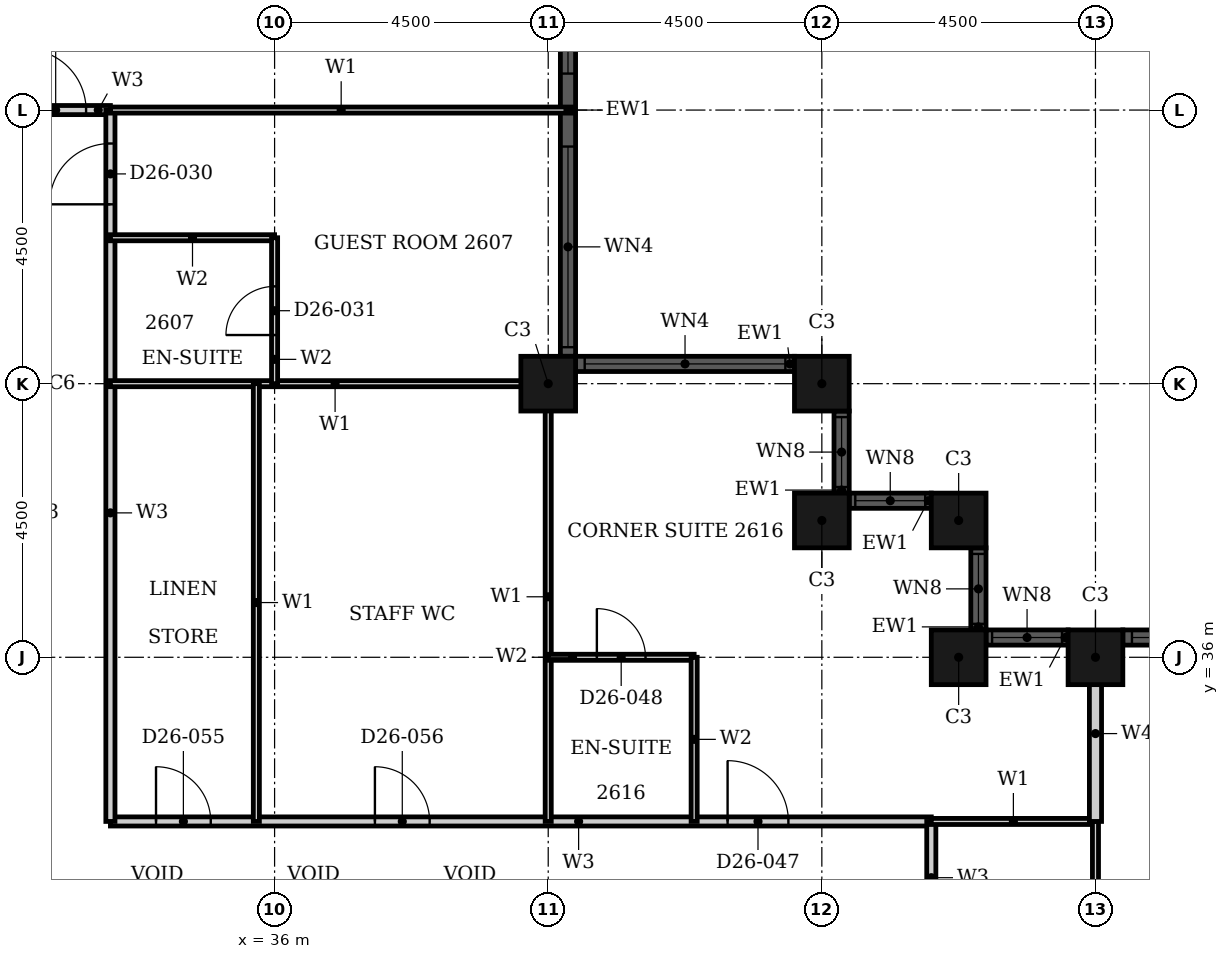
"""IFC4 building model, lengths in metres.
Left out: names, types, materials, properties, quantities, classifications, styles, units other than length and angle.
Written with IfcOpenShell. Run it as: python <this file> out.ifc"""

import sys

from ifc_helpers import new_model, si_unit, direction, frame, frame_2d, origin, origin_2d, place, context, subcontext, project, spatial, rectangle, hollow_rectangle, extrude, element, fill, save


model = new_model("IFC4")
c1 = context("Model", 3, precision=1e-05, world=origin(), true_north=direction((0.0, 1.0)))
c2 = subcontext(c1, "Body", "Model", "MODEL_VIEW")
j1 = project(units=[si_unit("LENGTHUNIT", "METRE"), si_unit("PLANEANGLEUNIT", "RADIAN")], contexts=[c1])
p1 = place(None, origin())
s1 = spatial("IfcSite", under=j1, at=p1, CompositionType="ELEMENT")
p2 = place(p1, origin())
s2 = spatial("IfcBuilding", under=s1, at=p2, CompositionType="ELEMENT")
p3 = place(p2, frame((0.0, 0.0, 108.0)))
s3 = spatial("IfcBuildingStorey", under=s2, at=p3, CompositionType="ELEMENT", Elevation=108.0)
for number, where, z_axis, x_axis in (
    (1, (49.5, 36.0, 0.0), (0.0, 0.0, 1.0), (1.0, 0.0, 0.0)),
    (2, (47.25, 36.0, 0.0), (0.0, 0.0, 1.0), (1.0, 0.0, 0.0)),
    (3, (47.25, 38.25, 0.0), (0.0, 0.0, 1.0), (1.0, 0.0, 0.0)),
    (4, (45.0, 38.25, 0.0), (0.0, 0.0, 1.0), (1.0, 0.0, 0.0)),
    (5, (45.0, 40.5, 0.0), (0.0, 0.0, 1.0), (1.0, 0.0, 0.0)),
    (6, (40.5, 40.5, 0.0), (0.0, 0.0, 1.0), (1.0, 0.0, 0.0)),
):
    element("IfcColumn", number, at=place(p3, frame(where, z_axis=z_axis, x_axis=x_axis)), inside=s3, PredefinedType="COLUMN", context=c2, shape_type="SweptSolid", body=[
        extrude(hollow_rectangle(XDim=0.9, YDim=0.9, WallThickness=0.028, at=origin_2d()), origin(), (0.0, 0.0, 1.0), 3.6),
    ])
p4 = place(p3, frame((58.05, 36.325, 0.0), z_axis=(0.0, 0.0, 1.0), x_axis=(-1.0, 0.0, 0.0)))
e7 = element("IfcWall", 7, at=p4, inside=s3, PredefinedType="SOLIDWALL", context=c2, shape_type="SweptSolid", body=[
    extrude(rectangle(XDim=8.1, YDim=0.25, at=frame_2d((4.05, 0.0))), origin(), (0.0, 0.0, 1.0), 3.6),
])
p5 = place(p4, frame((0.15, 0.0, 0.9)))
e8 = element("IfcOpeningElement", 8, at=p5, cuts=e7, PredefinedType="OPENING", context=c2, shape_type="SweptSolid", body=[
    extrude(rectangle(XDim=3.3, YDim=2.08, at=frame_2d((1.65, 1.04))), frame((0.0, 0.135, 0.0), z_axis=(0.0, -1.0, 0.0), x_axis=(1.0, 0.0, 0.0)), (0.0, 0.0, 1.0), 0.27),
])
p6 = place(p4, frame((4.65, 0.0, 0.9)))
e9 = element("IfcOpeningElement", 9, at=p6, cuts=e7, PredefinedType="OPENING", context=c2, shape_type="SweptSolid", body=[
    extrude(rectangle(XDim=3.3, YDim=2.08, at=frame_2d((1.65, 1.04))), frame((0.0, 0.135, 0.0), z_axis=(0.0, -1.0, 0.0), x_axis=(1.0, 0.0, 0.0)), (0.0, 0.0, 1.0), 0.27),
])
p7 = place(p3, frame((49.05, 36.325, 0.0), z_axis=(0.0, 0.0, 1.0), x_axis=(-1.0, 0.0, 0.0)))
e10 = element("IfcWall", 10, at=p7, inside=s3, PredefinedType="SOLIDWALL", context=c2, shape_type="SweptSolid", body=[
    extrude(rectangle(XDim=1.35, YDim=0.25, at=frame_2d((0.675, 0.0))), origin(), (0.0, 0.0, 1.0), 3.6),
])
p8 = place(p7, frame((0.1, 0.0, 0.9)))
e11 = element("IfcOpeningElement", 11, at=p8, cuts=e10, PredefinedType="OPENING", context=c2, shape_type="SweptSolid", body=[
    extrude(rectangle(XDim=1.15, YDim=2.08, at=frame_2d((0.575, 1.04))), frame((0.0, 0.135, 0.0), z_axis=(0.0, -1.0, 0.0), x_axis=(1.0, 0.0, 0.0)), (0.0, 0.0, 1.0), 0.27),
])
p9 = place(p3, frame((47.575, 36.45, 0.0), z_axis=(0.0, 0.0, 1.0), x_axis=(0.0, 1.0, 0.0)))
e12 = element("IfcWall", 12, at=p9, inside=s3, PredefinedType="SOLIDWALL", context=c2, shape_type="SweptSolid", body=[
    extrude(rectangle(XDim=1.35, YDim=0.25, at=frame_2d((0.675, 0.0))), origin(), (0.0, 0.0, 1.0), 3.6),
])
p10 = place(p9, frame((0.1, 0.0, 0.9)))
e13 = element("IfcOpeningElement", 13, at=p10, cuts=e12, PredefinedType="OPENING", context=c2, shape_type="SweptSolid", body=[
    extrude(rectangle(XDim=1.15, YDim=2.08, at=frame_2d((0.575, 1.04))), frame((0.0, 0.135, 0.0), z_axis=(0.0, -1.0, 0.0), x_axis=(1.0, 0.0, 0.0)), (0.0, 0.0, 1.0), 0.27),
])
p11 = place(p3, frame((46.8, 38.575, 0.0), z_axis=(0.0, 0.0, 1.0), x_axis=(-1.0, 0.0, 0.0)))
e14 = element("IfcWall", 14, at=p11, inside=s3, PredefinedType="SOLIDWALL", context=c2, shape_type="SweptSolid", body=[
    extrude(rectangle(XDim=1.35, YDim=0.25, at=frame_2d((0.675, 0.0))), origin(), (0.0, 0.0, 1.0), 3.6),
])
p12 = place(p11, frame((0.1, 0.0, 0.9)))
e15 = element("IfcOpeningElement", 15, at=p12, cuts=e14, PredefinedType="OPENING", context=c2, shape_type="SweptSolid", body=[
    extrude(rectangle(XDim=1.15, YDim=2.08, at=frame_2d((0.575, 1.04))), frame((0.0, 0.135, 0.0), z_axis=(0.0, -1.0, 0.0), x_axis=(1.0, 0.0, 0.0)), (0.0, 0.0, 1.0), 0.27),
])
p13 = place(p3, frame((45.325, 38.7, 0.0), z_axis=(0.0, 0.0, 1.0), x_axis=(0.0, 1.0, 0.0)))
e16 = element("IfcWall", 16, at=p13, inside=s3, PredefinedType="SOLIDWALL", context=c2, shape_type="SweptSolid", body=[
    extrude(rectangle(XDim=1.35, YDim=0.25, at=frame_2d((0.675, 0.0))), origin(), (0.0, 0.0, 1.0), 3.6),
])
p14 = place(p13, frame((0.1, 0.0, 0.9)))
e17 = element("IfcOpeningElement", 17, at=p14, cuts=e16, PredefinedType="OPENING", context=c2, shape_type="SweptSolid", body=[
    extrude(rectangle(XDim=1.15, YDim=2.08, at=frame_2d((0.575, 1.04))), frame((0.0, 0.135, 0.0), z_axis=(0.0, -1.0, 0.0), x_axis=(1.0, 0.0, 0.0)), (0.0, 0.0, 1.0), 0.27),
])
p15 = place(p3, frame((44.55, 40.825, 0.0), z_axis=(0.0, 0.0, 1.0), x_axis=(-1.0, 0.0, 0.0)))
e18 = element("IfcWall", 18, at=p15, inside=s3, PredefinedType="SOLIDWALL", context=c2, shape_type="SweptSolid", body=[
    extrude(rectangle(XDim=3.6, YDim=0.25, at=frame_2d((1.8, 0.0))), origin(), (0.0, 0.0, 1.0), 3.6),
])
p16 = place(p15, frame((0.15, 0.0, 0.9)))
e19 = element("IfcOpeningElement", 19, at=p16, cuts=e18, PredefinedType="OPENING", context=c2, shape_type="SweptSolid", body=[
    extrude(rectangle(XDim=3.3, YDim=2.08, at=frame_2d((1.65, 1.04))), frame((0.0, 0.135, 0.0), z_axis=(0.0, -1.0, 0.0), x_axis=(1.0, 0.0, 0.0)), (0.0, 0.0, 1.0), 0.27),
])
p17 = place(p3, frame((40.825, 40.95, 0.0), z_axis=(0.0, 0.0, 1.0), x_axis=(0.0, 1.0, 0.0)))
e20 = element("IfcWall", 20, at=p17, inside=s3, PredefinedType="SOLIDWALL", context=c2, shape_type="SweptSolid", body=[
    extrude(rectangle(XDim=8.1, YDim=0.25, at=frame_2d((4.05, 0.0))), origin(), (0.0, 0.0, 1.0), 3.6),
])
p18 = place(p17, frame((0.15, 0.0, 0.9)))
e21 = element("IfcOpeningElement", 21, at=p18, cuts=e20, PredefinedType="OPENING", context=c2, shape_type="SweptSolid", body=[
    extrude(rectangle(XDim=3.3, YDim=2.08, at=frame_2d((1.65, 1.04))), frame((0.0, 0.135, 0.0), z_axis=(0.0, -1.0, 0.0), x_axis=(1.0, 0.0, 0.0)), (0.0, 0.0, 1.0), 0.27),
])
p19 = place(p17, frame((4.65, 0.0, 0.9)))
e22 = element("IfcOpeningElement", 22, at=p19, cuts=e20, PredefinedType="OPENING", context=c2, shape_type="SweptSolid", body=[
    extrude(rectangle(XDim=3.3, YDim=2.08, at=frame_2d((1.65, 1.04))), frame((0.0, 0.135, 0.0), z_axis=(0.0, -1.0, 0.0), x_axis=(1.0, 0.0, 0.0)), (0.0, 0.0, 1.0), 0.27),
])
p20 = place(p3, frame((33.3, 33.3, 0.0), z_axis=(0.0, 0.0, 1.0), x_axis=(1.0, 0.0, 0.0)))
e23 = element("IfcWall", 23, at=p20, inside=s3, PredefinedType="PARTITIONING", context=c2, shape_type="SweptSolid", body=[
    extrude(rectangle(XDim=13.5, YDim=0.15, at=frame_2d((6.75, 0.0))), origin(), (0.0, 0.0, 1.0), 3.3),
])
p21 = place(p20, frame((10.15, 0.0, 0.0)))
e24 = element("IfcOpeningElement", 24, at=p21, cuts=e23, PredefinedType="OPENING", context=c2, shape_type="SweptSolid", body=[
    extrude(rectangle(XDim=1.0, YDim=2.1, at=frame_2d((0.5, 1.05))), frame((0.0, 0.085, 0.0), z_axis=(0.0, -1.0, 0.0), x_axis=(1.0, 0.0, 0.0)), (0.0, 0.0, 1.0), 0.17),
])
p22 = place(p20, frame((0.75, 0.0, 0.0)))
e25 = element("IfcOpeningElement", 25, at=p22, cuts=e23, PredefinedType="OPENING", context=c2, shape_type="SweptSolid", body=[
    extrude(rectangle(XDim=0.9, YDim=2.1, at=frame_2d((0.45, 1.05))), frame((0.0, 0.085, 0.0), z_axis=(0.0, -1.0, 0.0), x_axis=(1.0, 0.0, 0.0)), (0.0, 0.0, 1.0), 0.17),
])
p23 = place(p20, frame((4.35, 0.0, 0.0)))
e26 = element("IfcOpeningElement", 26, at=p23, cuts=e23, PredefinedType="OPENING", context=c2, shape_type="SweptSolid", body=[
    extrude(rectangle(XDim=0.9, YDim=2.1, at=frame_2d((0.45, 1.05))), frame((0.0, 0.085, 0.0), z_axis=(0.0, -1.0, 0.0), x_axis=(1.0, 0.0, 0.0)), (0.0, 0.0, 1.0), 0.17),
])
p24 = place(p3, frame((31.5, 45.0, 0.0), z_axis=(0.0, 0.0, 1.0), x_axis=(1.0, 0.0, 0.0)))
e27 = element("IfcWall", 27, at=p24, inside=s3, PredefinedType="PARTITIONING", context=c2, shape_type="SweptSolid", body=[
    extrude(rectangle(XDim=1.8, YDim=0.15, at=frame_2d((0.9, 0.0))), origin(), (0.0, 0.0, 1.0), 3.3),
])
p25 = place(p24, frame((0.4, 0.0, 0.0)))
e28 = element("IfcOpeningElement", 28, at=p25, cuts=e27, PredefinedType="OPENING", context=c2, shape_type="SweptSolid", body=[
    extrude(rectangle(XDim=1.0, YDim=2.1, at=frame_2d((0.5, 1.05))), frame((0.0, 0.085, 0.0), z_axis=(0.0, -1.0, 0.0), x_axis=(1.0, 0.0, 0.0)), (0.0, 0.0, 1.0), 0.17),
])
p26 = place(p3, frame((33.3, 33.3, 0.0), z_axis=(0.0, 0.0, 1.0), x_axis=(0.0, 1.0, 0.0)))
e29 = element("IfcWall", 29, at=p26, inside=s3, PredefinedType="PARTITIONING", context=c2, shape_type="SweptSolid", body=[
    extrude(rectangle(XDim=11.7, YDim=0.15, at=frame_2d((5.85, 0.0))), origin(), (0.0, 0.0, 1.0), 3.3),
])
p27 = place(p26, frame((10.15, 0.0, 0.0)))
e30 = element("IfcOpeningElement", 30, at=p27, cuts=e29, PredefinedType="OPENING", context=c2, shape_type="SweptSolid", body=[
    extrude(rectangle(XDim=1.0, YDim=2.1, at=frame_2d((0.5, 1.05))), frame((0.0, 0.085, 0.0), z_axis=(0.0, -1.0, 0.0), x_axis=(1.0, 0.0, 0.0)), (0.0, 0.0, 1.0), 0.17),
])
p28 = place(p3, frame((46.8, 28.8, 0.0), z_axis=(0.0, 0.0, 1.0), x_axis=(0.0, 1.0, 0.0)))
e31 = element("IfcWall", 31, at=p28, inside=s3, PredefinedType="PARTITIONING", context=c2, shape_type="SweptSolid", body=[
    extrude(rectangle(XDim=4.5, YDim=0.15, at=frame_2d((2.25, 0.0))), origin(), (0.0, 0.0, 1.0), 3.3),
])
p29 = place(p28, frame((1.75, 0.0, 0.0)))
e32 = element("IfcOpeningElement", 32, at=p29, cuts=e31, PredefinedType="OPENING", context=c2, shape_type="SweptSolid", body=[
    extrude(rectangle(XDim=0.9, YDim=2.1, at=frame_2d((0.45, 1.05))), frame((0.0, 0.085, 0.0), z_axis=(0.0, -1.0, 0.0), x_axis=(1.0, 0.0, 0.0)), (0.0, 0.0, 1.0), 0.17),
])
p30 = place(p3, frame((46.8, 33.3, 0.0), z_axis=(0.0, 0.0, 1.0), x_axis=(1.0, 0.0, 0.0)))
e33 = element("IfcWall", 33, at=p30, inside=s3, PredefinedType="PARTITIONING", context=c2, shape_type="SweptSolid", body=[
    extrude(rectangle(XDim=2.7, YDim=0.1, at=frame_2d((1.35, 0.0))), origin(), (0.0, 0.0, 1.0), 3.3),
])
p31 = place(p3, frame((33.3, 40.5, 0.0), z_axis=(0.0, 0.0, 1.0), x_axis=(1.0, 0.0, 0.0)))
e34 = element("IfcWall", 34, at=p31, inside=s3, PredefinedType="PARTITIONING", context=c2, shape_type="SweptSolid", body=[
    extrude(rectangle(XDim=7.39, YDim=0.1, at=frame_2d((3.695, 0.0))), origin(), (0.0, 0.0, 1.0), 2.38),
])
p32 = place(p3, frame((33.3, 45.0, 0.0), z_axis=(0.0, 0.0, 1.0), x_axis=(1.0, 0.0, 0.0)))
e35 = element("IfcWall", 35, at=p32, inside=s3, PredefinedType="PARTITIONING", context=c2, shape_type="SweptSolid", body=[
    extrude(rectangle(XDim=7.59, YDim=0.1, at=frame_2d((3.795, 0.0))), origin(), (0.0, 0.0, 1.0), 3.3),
])
p33 = place(p3, frame((35.7, 33.3, 0.0), z_axis=(0.0, 0.0, 1.0), x_axis=(0.0, 1.0, 0.0)))
e36 = element("IfcWall", 36, at=p33, inside=s3, PredefinedType="PARTITIONING", context=c2, shape_type="SweptSolid", body=[
    extrude(rectangle(XDim=7.2, YDim=0.1, at=frame_2d((3.6, 0.0))), origin(), (0.0, 0.0, 1.0), 3.3),
])
p34 = place(p3, frame((40.5, 33.3, 0.0), z_axis=(0.0, 0.0, 1.0), x_axis=(0.0, 1.0, 0.0)))
e37 = element("IfcWall", 37, at=p34, inside=s3, PredefinedType="PARTITIONING", context=c2, shape_type="SweptSolid", body=[
    extrude(rectangle(XDim=7.39, YDim=0.1, at=frame_2d((3.695, 0.0))), origin(), (0.0, 0.0, 1.0), 3.3),
])
p35 = place(p3, frame((49.5, 28.8, 0.0), z_axis=(0.0, 0.0, 1.0), x_axis=(0.0, 1.0, 0.0)))
e38 = element("IfcWall", 38, at=p35, inside=s3, PredefinedType="PARTITIONING", context=c2, shape_type="SweptSolid", body=[
    extrude(rectangle(XDim=4.5, YDim=0.1, at=frame_2d((2.25, 0.0))), origin(), (0.0, 0.0, 1.0), 2.38),
])
p36 = place(p3, frame((49.5, 33.3, 0.0), z_axis=(0.0, 0.0, 1.0), x_axis=(0.0, 1.0, 0.0)))
e39 = element("IfcWall", 39, at=p36, inside=s3, PredefinedType="PARTITIONING", context=c2, shape_type="SweptSolid", body=[
    extrude(rectangle(XDim=2.89, YDim=0.2, at=frame_2d((1.445, 0.0))), origin(), (0.0, 0.0, 1.0), 2.38),
])
p37 = place(p3, frame((40.5, 36.0, 0.0), z_axis=(0.0, 0.0, 1.0), x_axis=(1.0, 0.0, 0.0)))
e40 = element("IfcWall", 40, at=p37, inside=s3, PredefinedType="PARTITIONING", context=c2, shape_type="SweptSolid", body=[
    extrude(rectangle(XDim=2.4, YDim=0.1, at=frame_2d((1.2, 0.0))), origin(), (0.0, 0.0, 1.0), 3.3),
])
p38 = place(p37, frame((0.8, 0.0, 0.0)))
e41 = element("IfcOpeningElement", 41, at=p38, cuts=e40, PredefinedType="OPENING", context=c2, shape_type="SweptSolid", body=[
    extrude(rectangle(XDim=0.8, YDim=2.1, at=frame_2d((0.4, 1.05))), frame((0.0, 0.06, 0.0), z_axis=(0.0, -1.0, 0.0), x_axis=(1.0, 0.0, 0.0)), (0.0, 0.0, 1.0), 0.12),
])
p39 = place(p3, frame((33.3, 42.9, 0.0), z_axis=(0.0, 0.0, 1.0), x_axis=(1.0, 0.0, 0.0)))
e42 = element("IfcWall", 42, at=p39, inside=s3, PredefinedType="PARTITIONING", context=c2, shape_type="SweptSolid", body=[
    extrude(rectangle(XDim=2.7, YDim=0.1, at=frame_2d((1.35, 0.0))), origin(), (0.0, 0.0, 1.0), 3.3),
])
p40 = place(p3, frame((36.0, 40.5, 0.0), z_axis=(0.0, 0.0, 1.0), x_axis=(0.0, 1.0, 0.0)))
e43 = element("IfcWall", 43, at=p40, inside=s3, PredefinedType="PARTITIONING", context=c2, shape_type="SweptSolid", body=[
    extrude(rectangle(XDim=2.4, YDim=0.1, at=frame_2d((1.2, 0.0))), origin(), (0.0, 0.0, 1.0), 2.58),
])
p41 = place(p40, frame((0.8, 0.0, 0.0)))
e44 = element("IfcOpeningElement", 44, at=p41, cuts=e43, PredefinedType="OPENING", context=c2, shape_type="SweptSolid", body=[
    extrude(rectangle(XDim=0.8, YDim=2.1, at=frame_2d((0.4, 1.05))), frame((0.0, 0.06, 0.0), z_axis=(0.0, -1.0, 0.0), x_axis=(1.0, 0.0, 0.0)), (0.0, 0.0, 1.0), 0.12),
])
p42 = place(p3, frame((42.9, 33.3, 0.0), z_axis=(0.0, 0.0, 1.0), x_axis=(0.0, 1.0, 0.0)))
e45 = element("IfcWall", 45, at=p42, inside=s3, PredefinedType="PARTITIONING", context=c2, shape_type="SweptSolid", body=[
    extrude(rectangle(XDim=2.7, YDim=0.1, at=frame_2d((1.35, 0.0))), origin(), (0.0, 0.0, 1.0), 3.3),
])
p43 = place(p6, origin())
e46 = element("IfcWindow", 46, at=p43, inside=s3, PartitioningType="SINGLE_PANEL", PredefinedType="WINDOW", context=c2, shape_type="SweptSolid", body=[
    extrude(rectangle(XDim=3.3, YDim=2.08, at=frame_2d((1.65, 1.04))), frame((0.0, 0.03, 0.0), z_axis=(0.0, -1.0, 0.0), x_axis=(1.0, 0.0, 0.0)), (0.0, 0.0, 1.0), 0.06),
])
fill(e9, e46)
p44 = place(p8, origin())
e47 = element("IfcWindow", 47, at=p44, inside=s3, PartitioningType="SINGLE_PANEL", PredefinedType="WINDOW", context=c2, shape_type="SweptSolid", body=[
    extrude(rectangle(XDim=1.15, YDim=2.08, at=frame_2d((0.575, 1.04))), frame((0.0, 0.03, 0.0), z_axis=(0.0, -1.0, 0.0), x_axis=(1.0, 0.0, 0.0)), (0.0, 0.0, 1.0), 0.06),
])
fill(e11, e47)
p45 = place(p10, origin())
e48 = element("IfcWindow", 48, at=p45, inside=s3, PartitioningType="SINGLE_PANEL", PredefinedType="WINDOW", context=c2, shape_type="SweptSolid", body=[
    extrude(rectangle(XDim=1.15, YDim=2.08, at=frame_2d((0.575, 1.04))), frame((0.0, 0.03, 0.0), z_axis=(0.0, -1.0, 0.0), x_axis=(1.0, 0.0, 0.0)), (0.0, 0.0, 1.0), 0.06),
])
fill(e13, e48)
p46 = place(p12, origin())
e49 = element("IfcWindow", 49, at=p46, inside=s3, PartitioningType="SINGLE_PANEL", PredefinedType="WINDOW", context=c2, shape_type="SweptSolid", body=[
    extrude(rectangle(XDim=1.15, YDim=2.08, at=frame_2d((0.575, 1.04))), frame((0.0, 0.03, 0.0), z_axis=(0.0, -1.0, 0.0), x_axis=(1.0, 0.0, 0.0)), (0.0, 0.0, 1.0), 0.06),
])
fill(e15, e49)
p47 = place(p14, origin())
e50 = element("IfcWindow", 50, at=p47, inside=s3, PartitioningType="SINGLE_PANEL", PredefinedType="WINDOW", context=c2, shape_type="SweptSolid", body=[
    extrude(rectangle(XDim=1.15, YDim=2.08, at=frame_2d((0.575, 1.04))), frame((0.0, 0.03, 0.0), z_axis=(0.0, -1.0, 0.0), x_axis=(1.0, 0.0, 0.0)), (0.0, 0.0, 1.0), 0.06),
])
fill(e17, e50)
p48 = place(p16, origin())
e51 = element("IfcWindow", 51, at=p48, inside=s3, PartitioningType="SINGLE_PANEL", PredefinedType="WINDOW", context=c2, shape_type="SweptSolid", body=[
    extrude(rectangle(XDim=3.3, YDim=2.08, at=frame_2d((1.65, 1.04))), frame((0.0, 0.03, 0.0), z_axis=(0.0, -1.0, 0.0), x_axis=(1.0, 0.0, 0.0)), (0.0, 0.0, 1.0), 0.06),
])
fill(e19, e51)
p49 = place(p18, origin())
e52 = element("IfcWindow", 52, at=p49, inside=s3, PartitioningType="SINGLE_PANEL", PredefinedType="WINDOW", context=c2, shape_type="SweptSolid", body=[
    extrude(rectangle(XDim=3.3, YDim=2.08, at=frame_2d((1.65, 1.04))), frame((0.0, 0.03, 0.0), z_axis=(0.0, -1.0, 0.0), x_axis=(1.0, 0.0, 0.0)), (0.0, 0.0, 1.0), 0.06),
])
fill(e21, e52)
p50 = place(p19, origin())
e53 = element("IfcWindow", 53, at=p50, inside=s3, PartitioningType="SINGLE_PANEL", PredefinedType="WINDOW", context=c2, shape_type="SweptSolid", body=[
    extrude(rectangle(XDim=3.3, YDim=2.08, at=frame_2d((1.65, 1.04))), frame((0.0, 0.03, 0.0), z_axis=(0.0, -1.0, 0.0), x_axis=(1.0, 0.0, 0.0)), (0.0, 0.0, 1.0), 0.06),
])
fill(e22, e53)
p51 = place(p27, origin())
e54 = element("IfcDoor", 54, at=p51, inside=s3, OperationType="SINGLE_SWING_RIGHT", PredefinedType="DOOR", context=c2, shape_type="SweptSolid", body=[
    extrude(rectangle(XDim=1.0, YDim=2.1, at=frame_2d((0.5, 1.05))), frame((0.0, 0.025, 0.0), z_axis=(0.0, -1.0, 0.0), x_axis=(1.0, 0.0, 0.0)), (0.0, 0.0, 1.0), 0.05),
])
fill(e30, e54)
p52 = place(p41, origin())
e55 = element("IfcDoor", 55, at=p52, inside=s3, OperationType="SINGLE_SWING_RIGHT", PredefinedType="DOOR", context=c2, shape_type="SweptSolid", body=[
    extrude(rectangle(XDim=0.8, YDim=2.1, at=frame_2d((0.4, 1.05))), frame((0.0, 0.025, 0.0), z_axis=(0.0, -1.0, 0.0), x_axis=(1.0, 0.0, 0.0)), (0.0, 0.0, 1.0), 0.05),
])
fill(e44, e55)
p53 = place(p25, origin())
e56 = element("IfcDoor", 56, at=p53, inside=s3, OperationType="SINGLE_SWING_LEFT", PredefinedType="DOOR", context=c2, shape_type="SweptSolid", body=[
    extrude(rectangle(XDim=1.0, YDim=2.1, at=frame_2d((0.5, 1.05))), frame((0.0, 0.025, 0.0), z_axis=(0.0, -1.0, 0.0), x_axis=(1.0, 0.0, 0.0)), (0.0, 0.0, 1.0), 0.05),
])
fill(e28, e56)
p54 = place(p21, origin())
e57 = element("IfcDoor", 57, at=p54, inside=s3, OperationType="SINGLE_SWING_RIGHT", PredefinedType="DOOR", context=c2, shape_type="SweptSolid", body=[
    extrude(rectangle(XDim=1.0, YDim=2.1, at=frame_2d((0.5, 1.05))), frame((0.0, 0.025, 0.0), z_axis=(0.0, -1.0, 0.0), x_axis=(1.0, 0.0, 0.0)), (0.0, 0.0, 1.0), 0.05),
])
fill(e24, e57)
p55 = place(p38, origin())
e58 = element("IfcDoor", 58, at=p55, inside=s3, OperationType="SINGLE_SWING_LEFT", PredefinedType="DOOR", context=c2, shape_type="SweptSolid", body=[
    extrude(rectangle(XDim=0.8, YDim=2.1, at=frame_2d((0.4, 1.05))), frame((0.0, 0.025, 0.0), z_axis=(0.0, -1.0, 0.0), x_axis=(1.0, 0.0, 0.0)), (0.0, 0.0, 1.0), 0.05),
])
fill(e41, e58)
p56 = place(p22, origin())
e59 = element("IfcDoor", 59, at=p56, inside=s3, OperationType="SINGLE_SWING_RIGHT", PredefinedType="DOOR", context=c2, shape_type="SweptSolid", body=[
    extrude(rectangle(XDim=0.9, YDim=2.1, at=frame_2d((0.45, 1.05))), frame((0.0, 0.025, 0.0), z_axis=(0.0, -1.0, 0.0), x_axis=(1.0, 0.0, 0.0)), (0.0, 0.0, 1.0), 0.05),
])
fill(e25, e59)
p57 = place(p23, origin())
e60 = element("IfcDoor", 60, at=p57, inside=s3, OperationType="SINGLE_SWING_LEFT", PredefinedType="DOOR", context=c2, shape_type="SweptSolid", body=[
    extrude(rectangle(XDim=0.9, YDim=2.1, at=frame_2d((0.45, 1.05))), frame((0.0, 0.025, 0.0), z_axis=(0.0, -1.0, 0.0), x_axis=(1.0, 0.0, 0.0)), (0.0, 0.0, 1.0), 0.05),
])
fill(e26, e60)
save(model, sys.argv[1])
